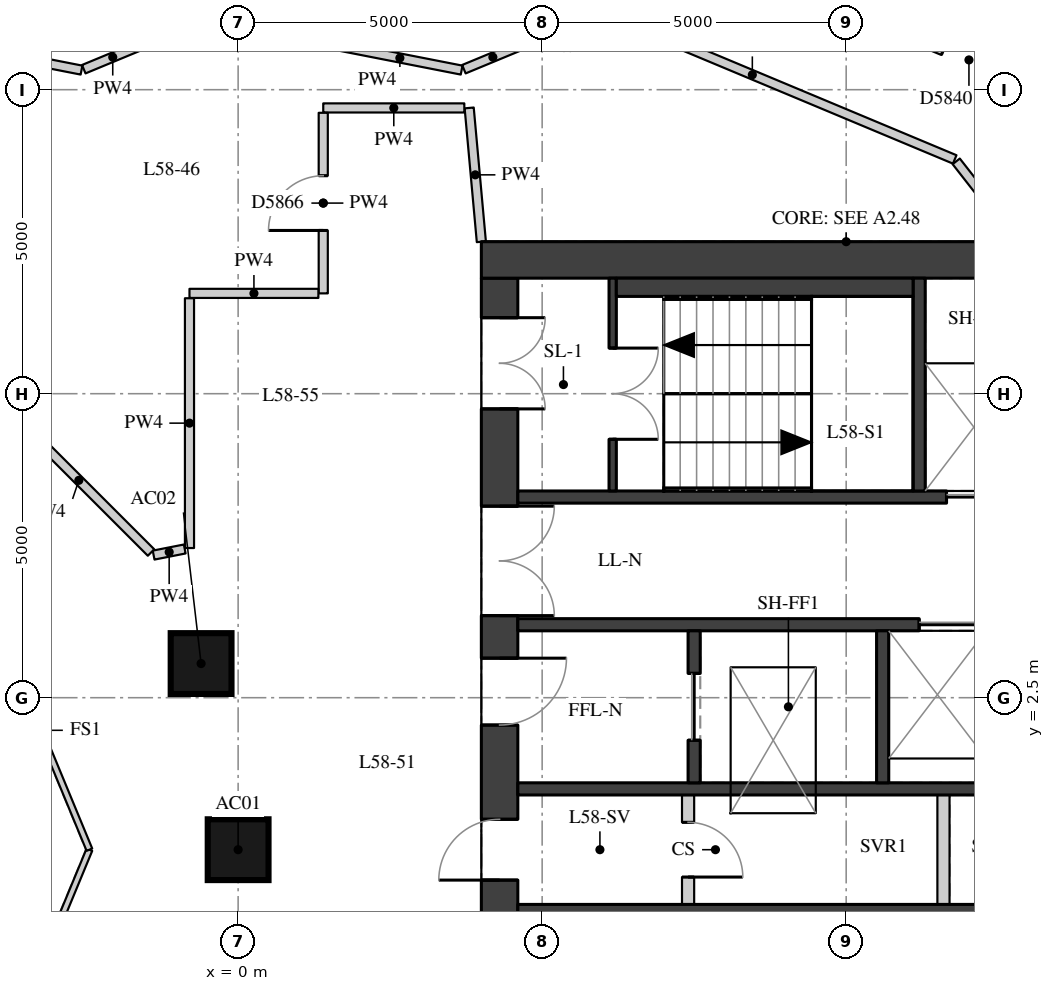
"""IFC4 building model, lengths in metres.
Left out: names, types, materials, properties, quantities, classifications, styles, units other than length and angle.
Written with IfcOpenShell. Run it as: python <this file> out.ifc"""

import sys

from ifc_helpers import new_model, si_unit, direction, frame, frame_2d, origin, origin_2d, place, context, subcontext, project, spatial, rectangle, extrude, element, fill, save


model = new_model("IFC4")
c1 = context("Model", 3, precision=1e-05, world=origin(), true_north=direction((0.0, 1.0)))
c2 = subcontext(c1, "Body", "Model", "MODEL_VIEW")
j1 = project(units=[si_unit("LENGTHUNIT", "METRE"), si_unit("PLANEANGLEUNIT", "RADIAN")], contexts=[c1])
p1 = place(None, origin())
s1 = spatial("IfcSite", under=j1, at=p1, CompositionType="ELEMENT")
p2 = place(p1, origin())
s2 = spatial("IfcBuilding", under=s1, at=p2, CompositionType="ELEMENT")
p3 = place(p2, frame((0.0, 0.0, 205.7)))
s3 = spatial("IfcBuildingStorey", under=s2, at=p3, CompositionType="ELEMENT", Elevation=205.7)
for number, where, z_axis, x_axis in (
    (1, (0.0, 0.0, 0.0), (0.0, 0.0, 1.0), (1.0, 0.0, 0.0)),
    (2, (-0.609, 3.062, 0.0), (0.0, 0.0, 1.0), (1.0, 0.0, 0.0)),
):
    element("IfcColumn", number, at=place(p3, frame(where, z_axis=z_axis, x_axis=x_axis)), inside=s3, PredefinedType="COLUMN", context=c2, shape_type="SweptSolid", body=[
        extrude(rectangle(XDim=1.0, YDim=1.0, at=origin_2d()), origin(), (0.0, 0.0, 1.0), 3.3),
    ])
p4 = place(p3, frame((4.3, -9.4, 0.0), z_axis=(0.0, 0.0, 1.0), x_axis=(0.0, 1.0, 0.0)))
e3 = element("IfcWall", 3, at=p4, inside=s3, PredefinedType="SHEAR", context=c2, shape_type="SweptSolid", body=[
    extrude(rectangle(XDim=18.8, YDim=0.6, at=frame_2d((9.4, 0.0))), origin(), (0.0, 0.0, 1.0), 3.02),
])
p5 = place(p4, frame((0.65, 0.0, 0.0)))
e4 = element("IfcOpeningElement", 4, at=p5, cuts=e3, PredefinedType="OPENING", context=c2, shape_type="SweptSolid", body=[
    extrude(rectangle(XDim=1.5, YDim=2.1, at=frame_2d((0.75, 1.05))), frame((0.0, 0.31, 0.0), z_axis=(0.0, -1.0, 0.0), x_axis=(1.0, 0.0, 0.0)), (0.0, 0.0, 1.0), 0.62),
])
p6 = place(p4, frame((3.75, 0.0, 0.0)))
e5 = element("IfcOpeningElement", 5, at=p6, cuts=e3, PredefinedType="OPENING", context=c2, shape_type="SweptSolid", body=[
    extrude(rectangle(XDim=1.8, YDim=2.1, at=frame_2d((0.9, 1.05))), frame((0.0, 0.31, 0.0), z_axis=(0.0, -1.0, 0.0), x_axis=(1.0, 0.0, 0.0)), (0.0, 0.0, 1.0), 0.62),
])
p7 = place(p4, frame((6.25, 0.0, 0.0)))
e6 = element("IfcOpeningElement", 6, at=p7, cuts=e3, PredefinedType="OPENING", context=c2, shape_type="SweptSolid", body=[
    extrude(rectangle(XDim=1.1, YDim=2.1, at=frame_2d((0.55, 1.05))), frame((0.0, 0.31, 0.0), z_axis=(0.0, -1.0, 0.0), x_axis=(1.0, 0.0, 0.0)), (0.0, 0.0, 1.0), 0.62),
])
p8 = place(p4, frame((8.9, 0.0, 0.0)))
e7 = element("IfcOpeningElement", 7, at=p8, cuts=e3, PredefinedType="OPENING", context=c2, shape_type="SweptSolid", body=[
    extrude(rectangle(XDim=1.0, YDim=2.1, at=frame_2d((0.5, 1.05))), frame((0.0, 0.31, 0.0), z_axis=(0.0, -1.0, 0.0), x_axis=(1.0, 0.0, 0.0)), (0.0, 0.0, 1.0), 0.62),
])
p9 = place(p4, frame((11.45, 0.0, 0.0)))
e8 = element("IfcOpeningElement", 8, at=p9, cuts=e3, PredefinedType="OPENING", context=c2, shape_type="SweptSolid", body=[
    extrude(rectangle(XDim=1.1, YDim=2.1, at=frame_2d((0.55, 1.05))), frame((0.0, 0.31, 0.0), z_axis=(0.0, -1.0, 0.0), x_axis=(1.0, 0.0, 0.0)), (0.0, 0.0, 1.0), 0.62),
])
p10 = place(p4, frame((13.25, 0.0, 0.0)))
e9 = element("IfcOpeningElement", 9, at=p10, cuts=e3, PredefinedType="OPENING", context=c2, shape_type="SweptSolid", body=[
    extrude(rectangle(XDim=1.8, YDim=2.1, at=frame_2d((0.9, 1.05))), frame((0.0, 0.31, 0.0), z_axis=(0.0, -1.0, 0.0), x_axis=(1.0, 0.0, 0.0)), (0.0, 0.0, 1.0), 0.62),
])
p11 = place(p4, frame((16.65, 0.0, 0.0)))
e10 = element("IfcOpeningElement", 10, at=p11, cuts=e3, PredefinedType="OPENING", context=c2, shape_type="SweptSolid", body=[
    extrude(rectangle(XDim=1.5, YDim=2.1, at=frame_2d((0.75, 1.05))), frame((0.0, 0.31, 0.0), z_axis=(0.0, -1.0, 0.0), x_axis=(1.0, 0.0, 0.0)), (0.0, 0.0, 1.0), 0.62),
])
p12 = place(p3, frame((4.0, 9.7, 0.0), z_axis=(0.0, 0.0, 1.0), x_axis=(1.0, 0.0, 0.0)))
e11 = element("IfcWall", 11, at=p12, inside=s3, PredefinedType="SHEAR", context=c2, shape_type="SweptSolid", body=[
    extrude(rectangle(XDim=12.0, YDim=0.6, at=frame_2d((6.0, 0.0))), origin(), (0.0, 0.0, 1.0), 3.02),
])
p13 = place(p3, frame((4.6, 5.8, 0.0), z_axis=(0.0, 0.0, 1.0), x_axis=(1.0, 0.0, 0.0)))
e12 = element("IfcWall", 12, at=p13, inside=s3, PredefinedType="SHEAR", context=c2, shape_type="SweptSolid", body=[
    extrude(rectangle(XDim=10.8, YDim=0.2, at=frame_2d((5.4, 0.0))), origin(), (0.0, 0.0, 1.0), 3.02),
])
p14 = place(p13, frame((7.05, 0.0, 0.0)))
e13 = element("IfcOpeningElement", 13, at=p14, cuts=e12, PredefinedType="OPENING", context=c2, shape_type="SweptSolid", body=[
    extrude(rectangle(XDim=1.1, YDim=2.1, at=frame_2d((0.55, 1.05))), frame((0.0, 0.11, 0.0), z_axis=(0.0, -1.0, 0.0), x_axis=(1.0, 0.0, 0.0)), (0.0, 0.0, 1.0), 0.22),
])
p15 = place(p13, frame((9.05, 0.0, 0.0)))
e14 = element("IfcOpeningElement", 14, at=p15, cuts=e12, PredefinedType="OPENING", context=c2, shape_type="SweptSolid", body=[
    extrude(rectangle(XDim=1.1, YDim=2.1, at=frame_2d((0.55, 1.05))), frame((0.0, 0.11, 0.0), z_axis=(0.0, -1.0, 0.0), x_axis=(1.0, 0.0, 0.0)), (0.0, 0.0, 1.0), 0.22),
])
p16 = place(p3, frame((4.6, 3.7, 0.0), z_axis=(0.0, 0.0, 1.0), x_axis=(1.0, 0.0, 0.0)))
e15 = element("IfcWall", 15, at=p16, inside=s3, PredefinedType="SHEAR", context=c2, shape_type="SweptSolid", body=[
    extrude(rectangle(XDim=10.8, YDim=0.2, at=frame_2d((5.4, 0.0))), origin(), (0.0, 0.0, 1.0), 3.02),
])
p17 = place(p16, frame((6.6, 0.0, 0.0)))
e16 = element("IfcOpeningElement", 16, at=p17, cuts=e15, PredefinedType="OPENING", context=c2, shape_type="SweptSolid", body=[
    extrude(rectangle(XDim=1.1, YDim=2.1, at=frame_2d((0.55, 1.05))), frame((0.0, 0.11, 0.0), z_axis=(0.0, -1.0, 0.0), x_axis=(1.0, 0.0, 0.0)), (0.0, 0.0, 1.0), 0.22),
])
p18 = place(p16, frame((8.9, 0.0, 0.0)))
e17 = element("IfcOpeningElement", 17, at=p18, cuts=e15, PredefinedType="OPENING", context=c2, shape_type="SweptSolid", body=[
    extrude(rectangle(XDim=1.1, YDim=2.1, at=frame_2d((0.55, 1.05))), frame((0.0, 0.11, 0.0), z_axis=(0.0, -1.0, 0.0), x_axis=(1.0, 0.0, 0.0)), (0.0, 0.0, 1.0), 0.22),
])
for number, where, z_axis, x_axis in (
    (18, (4.6, 1.0, 0.0), (0.0, 0.0, 1.0), (1.0, 0.0, 0.0)),
    (19, (4.6, -1.0, 0.0), (0.0, 0.0, 1.0), (1.0, 0.0, 0.0)),
):
    element("IfcWall", number, at=place(p3, frame(where, z_axis=z_axis, x_axis=x_axis)), inside=s3, PredefinedType="SHEAR", context=c2, shape_type="SweptSolid", body=[
        extrude(rectangle(XDim=10.8, YDim=0.2, at=frame_2d((5.4, 0.0))), origin(), (0.0, 0.0, 1.0), 3.02),
    ])
p19 = place(p3, frame((11.2, 5.9, 0.0), z_axis=(0.0, 0.0, 1.0), x_axis=(0.0, 1.0, 0.0)))
e20 = element("IfcWall", 20, at=p19, inside=s3, PredefinedType="SHEAR", context=c2, shape_type="SweptSolid", body=[
    extrude(rectangle(XDim=3.5, YDim=0.2, at=frame_2d((1.75, 0.0))), origin(), (0.0, 0.0, 1.0), 3.02),
])
p20 = place(p3, frame((7.5, 1.1, 0.0), z_axis=(0.0, 0.0, 1.0), x_axis=(0.0, 1.0, 0.0)))
e21 = element("IfcWall", 21, at=p20, inside=s3, PredefinedType="SHEAR", context=c2, shape_type="SweptSolid", body=[
    extrude(rectangle(XDim=2.5, YDim=0.2, at=frame_2d((1.25, 0.0))), origin(), (0.0, 0.0, 1.0), 3.02),
])
p21 = place(p20, frame((0.7, 0.0, 0.0)))
e22 = element("IfcOpeningElement", 22, at=p21, cuts=e21, PredefinedType="OPENING", context=c2, shape_type="SweptSolid", body=[
    extrude(rectangle(XDim=1.1, YDim=2.1, at=frame_2d((0.55, 1.05))), frame((0.0, 0.11, 0.0), z_axis=(0.0, -1.0, 0.0), x_axis=(1.0, 0.0, 0.0)), (0.0, 0.0, 1.0), 0.22),
])
p22 = place(p3, frame((10.6, 1.1, 0.0), z_axis=(0.0, 0.0, 1.0), x_axis=(0.0, 1.0, 0.0)))
e23 = element("IfcWall", 23, at=p22, inside=s3, PredefinedType="SHEAR", context=c2, shape_type="SweptSolid", body=[
    extrude(rectangle(XDim=2.5, YDim=0.2, at=frame_2d((1.25, 0.0))), origin(), (0.0, 0.0, 1.0), 3.02),
])
p23 = place(p3, frame((6.16, 5.9, 0.0), z_axis=(0.0, 0.0, 1.0), x_axis=(0.0, 1.0, 0.0)))
e24 = element("IfcWall", 24, at=p23, inside=s3, PredefinedType="SHEAR", context=c2, shape_type="SweptSolid", body=[
    extrude(rectangle(XDim=3.5, YDim=0.12, at=frame_2d((1.75, 0.0))), origin(), (0.0, 0.0, 1.0), 3.02),
])
p24 = place(p23, frame((0.85, 0.0, 0.0)))
e25 = element("IfcOpeningElement", 25, at=p24, cuts=e24, PredefinedType="OPENING", context=c2, shape_type="SweptSolid", body=[
    extrude(rectangle(XDim=1.5, YDim=2.1, at=frame_2d((0.75, 1.05))), frame((0.0, 0.07, 0.0), z_axis=(0.0, -1.0, 0.0), x_axis=(1.0, 0.0, 0.0)), (0.0, 0.0, 1.0), 0.14),
])
p25 = place(p3, frame((7.4, -0.9, 0.0), z_axis=(0.0, 0.0, 1.0), x_axis=(0.0, 1.0, 0.0)))
e26 = element("IfcWall", 26, at=p25, inside=s3, PredefinedType="PARTITIONING", context=c2, shape_type="SweptSolid", body=[
    extrude(rectangle(XDim=1.8, YDim=0.2, at=frame_2d((0.9, 0.0))), origin(), (0.0, 0.0, 1.0), 3.02),
])
p26 = place(p25, frame((0.45, 0.0, 0.0)))
e27 = element("IfcOpeningElement", 27, at=p26, cuts=e26, PredefinedType="OPENING", context=c2, shape_type="SweptSolid", body=[
    extrude(rectangle(XDim=0.9, YDim=2.1, at=frame_2d((0.45, 1.05))), frame((0.0, 0.11, 0.0), z_axis=(0.0, -1.0, 0.0), x_axis=(1.0, 0.0, 0.0)), (0.0, 0.0, 1.0), 0.22),
])
p27 = place(p3, frame((11.6, -0.9, 0.0), z_axis=(0.0, 0.0, 1.0), x_axis=(0.0, 1.0, 0.0)))
e28 = element("IfcWall", 28, at=p27, inside=s3, PredefinedType="PARTITIONING", context=c2, shape_type="SweptSolid", body=[
    extrude(rectangle(XDim=1.8, YDim=0.2, at=frame_2d((0.9, 0.0))), origin(), (0.0, 0.0, 1.0), 3.02),
])
p28 = place(p3, frame((6.22, 9.25, 0.0), z_axis=(0.0, 0.0, 1.0), x_axis=(1.0, 0.0, 0.0)))
e29 = element("IfcWall", 29, at=p28, inside=s3, PredefinedType="PARTITIONING", context=c2, shape_type="SweptSolid", body=[
    extrude(rectangle(XDim=4.88, YDim=0.3, at=frame_2d((2.44, 0.0))), origin(), (0.0, 0.0, 1.0), 3.02),
])
p29 = place(p3, frame((4.052, 16.323, 0.0), z_axis=(0.0, 0.0, 1.0), x_axis=(0.922513794011, -0.385964117322, 0.0)))
e30 = element("IfcWall", 30, at=p29, inside=s3, PredefinedType="PARTITIONING", context=c2, shape_type="SweptSolid", body=[
    extrude(rectangle(XDim=9.47, YDim=0.2, at=frame_2d((4.735, 0.0))), origin(), (0.0, 0.0, 1.0), 3.02),
])
p30 = place(p29, frame((8.186, 0.0, 0.0)))
e31 = element("IfcOpeningElement", 31, at=p30, cuts=e30, PredefinedType="OPENING", context=c2, shape_type="SweptSolid", body=[
    extrude(rectangle(XDim=0.9, YDim=2.1, at=frame_2d((0.45, 1.05))), frame((0.0, 0.11, 0.0), z_axis=(0.0, -1.0, 0.0), x_axis=(1.0, 0.0, 0.0)), (0.0, 0.0, 1.0), 0.22),
])
p31 = place(p29, frame((2.639, 0.0, 0.0)))
e32 = element("IfcOpeningElement", 32, at=p31, cuts=e30, PredefinedType="OPENING", context=c2, shape_type="SweptSolid", body=[
    extrude(rectangle(XDim=1.1, YDim=2.1, at=frame_2d((0.55, 1.05))), frame((0.0, 0.11, 0.0), z_axis=(0.0, -1.0, 0.0), x_axis=(1.0, 0.0, 0.0)), (0.0, 0.0, 1.0), 0.22),
])
p32 = place(p3, frame((4.0, 9.999, 0.0), z_axis=(0.0, 0.0, 1.0), x_axis=(-0.090475982725, 0.995898637689, 0.0)))
e33 = element("IfcWall", 33, at=p32, inside=s3, PredefinedType="PARTITIONING", context=c2, shape_type="SweptSolid", body=[
    extrude(rectangle(XDim=2.21, YDim=0.15, at=frame_2d((1.105, 0.0))), origin(), (0.0, 0.0, 1.0), 3.02),
])
p33 = place(p3, frame((3.72, 12.2, 0.0), z_axis=(0.0, 0.0, 1.0), x_axis=(-1.0, 0.0, 0.0)))
e34 = element("IfcWall", 34, at=p33, inside=s3, PredefinedType="PARTITIONING", context=c2, shape_type="SweptSolid", body=[
    extrude(rectangle(XDim=2.32, YDim=0.15, at=frame_2d((1.16, 0.0))), origin(), (0.0, 0.0, 1.0), 3.02),
])
p34 = place(p3, frame((1.4, 12.12, 0.0), z_axis=(0.0, 0.0, 1.0), x_axis=(0.0, -1.0, 0.0)))
e35 = element("IfcWall", 35, at=p34, inside=s3, PredefinedType="PARTITIONING", context=c2, shape_type="SweptSolid", body=[
    extrude(rectangle(XDim=2.97, YDim=0.15, at=frame_2d((1.485, 0.0))), origin(), (0.0, 0.0, 1.0), 3.02),
])
p35 = place(p34, frame((1.035, 0.0, 0.0)))
e36 = element("IfcOpeningElement", 36, at=p35, cuts=e35, PredefinedType="OPENING", context=c2, shape_type="SweptSolid", body=[
    extrude(rectangle(XDim=0.9, YDim=2.1, at=frame_2d((0.45, 1.05))), frame((0.0, 0.085, 0.0), z_axis=(0.0, -1.0, 0.0), x_axis=(1.0, 0.0, 0.0)), (0.0, 0.0, 1.0), 0.17),
])
p36 = place(p3, frame((1.32, 9.15, 0.0), z_axis=(0.0, 0.0, 1.0), x_axis=(-1.0, 0.0, 0.0)))
e37 = element("IfcWall", 37, at=p36, inside=s3, PredefinedType="PARTITIONING", context=c2, shape_type="SweptSolid", body=[
    extrude(rectangle(XDim=2.12, YDim=0.15, at=frame_2d((1.06, 0.0))), origin(), (0.0, 0.0, 1.0), 3.02),
])
p37 = place(p3, frame((-0.8, 9.07, 0.0), z_axis=(0.0, 0.0, 1.0), x_axis=(0.0, -1.0, 0.0)))
e38 = element("IfcWall", 38, at=p37, inside=s3, PredefinedType="PARTITIONING", context=c2, shape_type="SweptSolid", body=[
    extrude(rectangle(XDim=4.108, YDim=0.15, at=frame_2d((2.054, 0.0))), origin(), (0.0, 0.0, 1.0), 3.02),
])
p38 = place(p3, frame((-0.878, 4.946, 0.0), z_axis=(0.0, 0.0, 1.0), x_axis=(-0.981223514921, -0.192874087857, 0.0)))
e39 = element("IfcWall", 39, at=p38, inside=s3, PredefinedType="PARTITIONING", context=c2, shape_type="SweptSolid", body=[
    extrude(rectangle(XDim=0.521, YDim=0.15, at=frame_2d((0.261, 0.0))), origin(), (0.0, 0.0, 1.0), 3.02),
])
p39 = place(p3, frame((-1.432, 4.888, 0.0), z_axis=(0.0, 0.0, 1.0), x_axis=(-0.70714312975, 0.707070430754, 0.0)))
e40 = element("IfcWall", 40, at=p39, inside=s3, PredefinedType="PARTITIONING", context=c2, shape_type="SweptSolid", body=[
    extrude(rectangle(XDim=3.358, YDim=0.15, at=frame_2d((1.679, 0.0))), origin(), (0.0, 0.0, 1.0), 3.02),
])
p40 = place(p3, frame((-4.607, 13.22, 0.0), z_axis=(0.0, 0.0, 1.0), x_axis=(0.981304142817, -0.192463449234, 0.0)))
e41 = element("IfcWall", 41, at=p40, inside=s3, PredefinedType="PARTITIONING", context=c2, shape_type="SweptSolid", body=[
    extrude(rectangle(XDim=2.07, YDim=0.15, at=frame_2d((1.035, 0.0))), origin(), (0.0, 0.0, 1.0), 3.02),
])
p41 = place(p3, frame((-2.539, 12.837, 0.0), z_axis=(0.0, 0.0, 1.0), x_axis=(0.923768662954, 0.382950985565, 0.0)))
e42 = element("IfcWall", 42, at=p41, inside=s3, PredefinedType="PARTITIONING", context=c2, shape_type="SweptSolid", body=[
    extrude(rectangle(XDim=1.031, YDim=0.15, at=frame_2d((0.516, 0.0))), origin(), (0.0, 0.0, 1.0), 3.02),
])
p42 = place(p3, frame((1.644, 13.22, 0.0), z_axis=(0.0, 0.0, 1.0), x_axis=(0.981304142817, -0.192463449234, 0.0)))
e43 = element("IfcWall", 43, at=p42, inside=s3, PredefinedType="PARTITIONING", context=c2, shape_type="SweptSolid", body=[
    extrude(rectangle(XDim=2.07, YDim=0.15, at=frame_2d((1.035, 0.0))), origin(), (0.0, 0.0, 1.0), 3.02),
])
p43 = place(p3, frame((3.713, 12.837, 0.0), z_axis=(0.0, 0.0, 1.0), x_axis=(0.923768662954, 0.382950985565, 0.0)))
e44 = element("IfcWall", 44, at=p43, inside=s3, PredefinedType="PARTITIONING", context=c2, shape_type="SweptSolid", body=[
    extrude(rectangle(XDim=1.031, YDim=0.15, at=frame_2d((0.516, 0.0))), origin(), (0.0, 0.0, 1.0), 3.02),
])
p44 = place(p3, frame((5.128, 14.138, 0.0), z_axis=(0.0, 0.0, 1.0), x_axis=(0.922514397623, -0.385962674591, 0.0)))
e45 = element("IfcWall", 45, at=p44, inside=s3, PredefinedType="PARTITIONING", context=c2, shape_type="SweptSolid", body=[
    extrude(rectangle(XDim=7.216, YDim=0.15, at=frame_2d((3.608, 0.0))), origin(), (0.0, 0.0, 1.0), 3.02),
])
p45 = place(p3, frame((11.81, 11.321, 0.0), z_axis=(0.0, 0.0, 1.0), x_axis=(0.615964296608, -0.787774069962, 0.0)))
e46 = element("IfcWall", 46, at=p45, inside=s3, PredefinedType="PARTITIONING", context=c2, shape_type="SweptSolid", body=[
    extrude(rectangle(XDim=1.627, YDim=0.15, at=frame_2d((0.813, 0.0))), origin(), (0.0, 0.0, 1.0), 3.02),
])
for number, where, z_axis, x_axis in (
    (47, (-2.446, 0.0, 0.0), (0.0, 0.0, 1.0), (-0.383, -0.924, 0.0)),
    (48, (-4.073, 3.927, 0.0), (0.0, 0.0, 1.0), (0.383, -0.924, 0.0)),
):
    element("IfcWall", number, at=place(p3, frame(where, z_axis=z_axis, x_axis=x_axis)), inside=s3, PredefinedType="PARTITIONING", context=c2, shape_type="SweptSolid", body=[
        extrude(rectangle(XDim=4.251, YDim=0.1, at=frame_2d((2.125, 0.0))), origin(), (0.0, 0.0, 1.0), 3.02),
    ])
p46 = place(p8, origin())
e49 = element("IfcDoor", 49, at=p46, inside=s3, OperationType="SINGLE_SWING_LEFT", PredefinedType="DOOR", context=c2, shape_type="SweptSolid", body=[
    extrude(rectangle(XDim=1.0, YDim=2.1, at=frame_2d((0.5, 1.05))), frame((0.0, 0.025, 0.0), z_axis=(0.0, -1.0, 0.0), x_axis=(1.0, 0.0, 0.0)), (0.0, 0.0, 1.0), 0.05),
])
fill(e7, e49)
p47 = place(p9, origin())
e50 = element("IfcDoor", 50, at=p47, inside=s3, OperationType="SINGLE_SWING_LEFT", PredefinedType="DOOR", context=c2, shape_type="SweptSolid", body=[
    extrude(rectangle(XDim=1.1, YDim=2.1, at=frame_2d((0.55, 1.05))), frame((0.0, 0.025, 0.0), z_axis=(0.0, -1.0, 0.0), x_axis=(1.0, 0.0, 0.0)), (0.0, 0.0, 1.0), 0.05),
])
fill(e8, e50)
p48 = place(p10, origin())
e51 = element("IfcDoor", 51, at=p48, inside=s3, OperationType="DOUBLE_DOOR_SINGLE_SWING", PredefinedType="DOOR", context=c2, shape_type="SweptSolid", body=[
    extrude(rectangle(XDim=1.8, YDim=2.1, at=frame_2d((0.9, 1.05))), frame((0.0, 0.025, 0.0), z_axis=(0.0, -1.0, 0.0), x_axis=(1.0, 0.0, 0.0)), (0.0, 0.0, 1.0), 0.05),
])
fill(e9, e51)
p49 = place(p11, origin())
e52 = element("IfcDoor", 52, at=p49, inside=s3, OperationType="DOUBLE_DOOR_SINGLE_SWING", PredefinedType="DOOR", context=c2, shape_type="SweptSolid", body=[
    extrude(rectangle(XDim=1.5, YDim=2.1, at=frame_2d((0.75, 1.05))), frame((0.0, 0.025, 0.0), z_axis=(0.0, -1.0, 0.0), x_axis=(1.0, 0.0, 0.0)), (0.0, 0.0, 1.0), 0.05),
])
fill(e10, e52)
p50 = place(p24, origin())
e53 = element("IfcDoor", 53, at=p50, inside=s3, OperationType="DOUBLE_DOOR_SINGLE_SWING", PredefinedType="DOOR", context=c2, shape_type="SweptSolid", body=[
    extrude(rectangle(XDim=1.5, YDim=2.1, at=frame_2d((0.75, 1.05))), frame((0.0, 0.025, 0.0), z_axis=(0.0, -1.0, 0.0), x_axis=(1.0, 0.0, 0.0)), (0.0, 0.0, 1.0), 0.05),
])
fill(e25, e53)
p51 = place(p14, origin())
e54 = element("IfcDoor", 54, at=p51, inside=s3, OperationType="DOUBLE_DOOR_SLIDING", PredefinedType="DOOR", context=c2, shape_type="SweptSolid", body=[
    extrude(rectangle(XDim=1.1, YDim=2.1, at=frame_2d((0.55, 1.05))), frame((0.0, 0.025, 0.0), z_axis=(0.0, -1.0, 0.0), x_axis=(1.0, 0.0, 0.0)), (0.0, 0.0, 1.0), 0.05),
])
fill(e13, e54)
p52 = place(p17, origin())
e55 = element("IfcDoor", 55, at=p52, inside=s3, OperationType="DOUBLE_DOOR_SLIDING", PredefinedType="DOOR", context=c2, shape_type="SweptSolid", body=[
    extrude(rectangle(XDim=1.1, YDim=2.1, at=frame_2d((0.55, 1.05))), frame((0.0, 0.025, 0.0), z_axis=(0.0, -1.0, 0.0), x_axis=(1.0, 0.0, 0.0)), (0.0, 0.0, 1.0), 0.05),
])
fill(e16, e55)
p53 = place(p21, origin())
e56 = element("IfcDoor", 56, at=p53, inside=s3, OperationType="DOUBLE_DOOR_SLIDING", PredefinedType="DOOR", context=c2, shape_type="SweptSolid", body=[
    extrude(rectangle(XDim=1.1, YDim=2.1, at=frame_2d((0.55, 1.05))), frame((0.0, 0.025, 0.0), z_axis=(0.0, -1.0, 0.0), x_axis=(1.0, 0.0, 0.0)), (0.0, 0.0, 1.0), 0.05),
])
fill(e22, e56)
p54 = place(p26, origin())
e57 = element("IfcDoor", 57, at=p54, inside=s3, OperationType="SINGLE_SWING_RIGHT", PredefinedType="DOOR", context=c2, shape_type="SweptSolid", body=[
    extrude(rectangle(XDim=0.9, YDim=2.1, at=frame_2d((0.45, 1.05))), frame((0.0, 0.025, 0.0), z_axis=(0.0, -1.0, 0.0), x_axis=(1.0, 0.0, 0.0)), (0.0, 0.0, 1.0), 0.05),
])
fill(e27, e57)
p55 = place(p30, origin())
e58 = element("IfcDoor", 58, at=p55, inside=s3, OperationType="SINGLE_SWING_LEFT", PredefinedType="DOOR", context=c2, shape_type="SweptSolid", body=[
    extrude(rectangle(XDim=0.9, YDim=2.1, at=frame_2d((0.45, 1.05))), frame((0.0, 0.025, 0.0), z_axis=(0.0, -1.0, 0.0), x_axis=(1.0, 0.0, 0.0)), (0.0, 0.0, 1.0), 0.05),
])
fill(e31, e58)
p56 = place(p35, origin())
e59 = element("IfcDoor", 59, at=p56, inside=s3, OperationType="SINGLE_SWING_LEFT", PredefinedType="DOOR", context=c2, shape_type="SweptSolid", body=[
    extrude(rectangle(XDim=0.9, YDim=2.1, at=frame_2d((0.45, 1.05))), frame((0.0, 0.025, 0.0), z_axis=(0.0, -1.0, 0.0), x_axis=(1.0, 0.0, 0.0)), (0.0, 0.0, 1.0), 0.05),
])
fill(e36, e59)
save(model, sys.argv[1])
